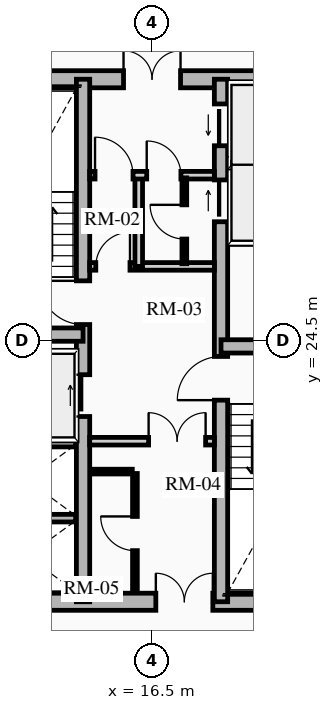
"""IFC4 building model, lengths in metres.
Left out: names, types, materials, properties, quantities, classifications, styles, units other than length and angle.
Written with IfcOpenShell. Run it as: python <this file> out.ifc"""

import sys

from ifc_helpers import new_model, si_unit, direction, frame, frame_2d, origin, place, context, subcontext, project, spatial, rectangle, extrude, source, transform, mapped, element, fill, save


model = new_model("IFC4")
c1 = context("Model", 3, precision=1e-05, world=origin(), true_north=direction((0.0, 1.0)))
c2 = subcontext(c1, "Body", "Model", "MODEL_VIEW")
j1 = project(units=[si_unit("LENGTHUNIT", "METRE"), si_unit("PLANEANGLEUNIT", "RADIAN")], contexts=[c1])
p1 = place(None, origin())
s1 = spatial("IfcSite", under=j1, at=p1, CompositionType="ELEMENT")
p2 = place(p1, origin())
s2 = spatial("IfcBuilding", under=s1, at=p2, CompositionType="ELEMENT")
p3 = place(p2, frame((0.0, 0.0, 105.07)))
s3 = spatial("IfcBuildingStorey", under=s2, at=p3, CompositionType="ELEMENT", Elevation=105.07)
p4 = place(p3, frame((11.15, 17.625, 0.0), z_axis=(0.0, 0.0, 1.0), x_axis=(1.0, 0.0, 0.0)))
e1 = element("IfcWall", 1, at=p4, inside=s3, PredefinedType="SHEAR", context=c2, shape_type="SweptSolid", body=[
    extrude(rectangle(XDim=10.7, YDim=0.45, at=frame_2d((5.35, 0.0))), origin(), (0.0, 0.0, 1.0), 2.91),
])
m1 = source(origin(), c2, "Body", "SweptSolid", [
    extrude(rectangle(XDim=1.5, YDim=2.02, at=frame_2d((0.75, 1.01))), frame((0.0, 0.235, 0.0), z_axis=(0.0, -1.0, 0.0), x_axis=(1.0, 0.0, 0.0)), (0.0, 0.0, 1.0), 0.47),
])
p5 = place(p4, frame((5.45, 0.0, 0.0)))
e2 = element("IfcOpeningElement", 2, at=p5, cuts=e1, PredefinedType="OPENING", context=c2, shape_type="MappedRepresentation", body=[
    mapped(m1, transform((0.0, 0.0, 0.0), x_axis=(1.0, 0.0, 0.0), y_axis=(0.0, 1.0, 0.0), z_axis=(0.0, 0.0, 1.0), scale=1.0)),
])
p6 = place(p3, frame((11.15, 31.375, 0.0), z_axis=(0.0, 0.0, 1.0), x_axis=(1.0, 0.0, 0.0)))
e3 = element("IfcWall", 3, at=p6, inside=s3, PredefinedType="SHEAR", context=c2, shape_type="SweptSolid", body=[
    extrude(rectangle(XDim=10.7, YDim=0.45, at=frame_2d((5.35, 0.0))), origin(), (0.0, 0.0, 1.0), 2.91),
])
p7 = place(p6, frame((4.6, 0.0, 0.0)))
e4 = element("IfcOpeningElement", 4, at=p7, cuts=e3, PredefinedType="OPENING", context=c2, shape_type="MappedRepresentation", body=[
    mapped(m1, transform((0.0, 0.0, 0.0), x_axis=(1.0, 0.0, 0.0), y_axis=(0.0, 1.0, 0.0), z_axis=(0.0, 0.0, 1.0), scale=1.0)),
])
p8 = place(p3, frame((14.685, 17.625, 0.0), z_axis=(0.0, 0.0, 1.0), x_axis=(0.0, 1.0, 0.0)))
e5 = element("IfcWall", 5, at=p8, inside=s3, PredefinedType="SHEAR", context=c2, shape_type="SweptSolid", body=[
    extrude(rectangle(XDim=13.75, YDim=0.35, at=frame_2d((6.875, 0.0))), origin(), (0.0, 0.0, 1.0), 2.91),
])
m2 = source(origin(), c2, "Body", "SweptSolid", [
    extrude(rectangle(XDim=1.1, YDim=2.015, at=frame_2d((0.55, 1.007))), frame((0.0, 0.185, 0.0), z_axis=(0.0, -1.0, 0.0), x_axis=(1.0, 0.0, 0.0)), (0.0, 0.0, 1.0), 0.37),
])
p9 = place(p8, frame((4.875, 0.0, 0.0)))
e6 = element("IfcOpeningElement", 6, at=p9, cuts=e5, PredefinedType="OPENING", context=c2, shape_type="MappedRepresentation", body=[
    mapped(m2, transform((0.0, 0.0, 0.0), x_axis=(1.0, 0.0, 0.0), y_axis=(0.0, 1.0, 0.0), z_axis=(0.0, 0.0, 1.0), scale=1.0)),
])
m3 = source(origin(), c2, "Body", "SweptSolid", [
    extrude(rectangle(XDim=1.15, YDim=2.02, at=frame_2d((0.575, 1.01))), frame((0.0, 0.185, 0.0), z_axis=(0.0, -1.0, 0.0), x_axis=(1.0, 0.0, 0.0)), (0.0, 0.0, 1.0), 0.37),
])
p10 = place(p8, frame((7.295, 0.0, 0.0)))
e7 = element("IfcOpeningElement", 7, at=p10, cuts=e5, PredefinedType="OPENING", context=c2, shape_type="MappedRepresentation", body=[
    mapped(m3, transform((0.0, 0.0, 0.0), x_axis=(1.0, 0.0, 0.0), y_axis=(0.0, 1.0, 0.0), z_axis=(0.0, 0.0, 1.0), scale=1.0)),
])
p11 = place(p3, frame((18.315, 17.625, 0.0), z_axis=(0.0, 0.0, 1.0), x_axis=(0.0, 1.0, 0.0)))
e8 = element("IfcWall", 8, at=p11, inside=s3, PredefinedType="SHEAR", context=c2, shape_type="SweptSolid", body=[
    extrude(rectangle(XDim=13.75, YDim=0.35, at=frame_2d((6.875, 0.0))), origin(), (0.0, 0.0, 1.0), 2.91),
])
p12 = place(p11, frame((10.0, 0.0, 0.0)))
e9 = element("IfcOpeningElement", 9, at=p12, cuts=e8, PredefinedType="OPENING", context=c2, shape_type="MappedRepresentation", body=[
    mapped(m2, transform((0.0, 0.0, 0.0), x_axis=(1.0, 0.0, 0.0), y_axis=(0.0, 1.0, 0.0), z_axis=(0.0, 0.0, 1.0), scale=1.0)),
])
p13 = place(p11, frame((12.0, 0.0, 0.0)))
e10 = element("IfcOpeningElement", 10, at=p13, cuts=e8, PredefinedType="OPENING", context=c2, shape_type="MappedRepresentation", body=[
    mapped(m2, transform((0.0, 0.0, 0.0), x_axis=(1.0, 0.0, 0.0), y_axis=(0.0, 1.0, 0.0), z_axis=(0.0, 0.0, 1.0), scale=1.0)),
])
p14 = place(p11, frame((5.305, 0.0, 0.0)))
e11 = element("IfcOpeningElement", 11, at=p14, cuts=e8, PredefinedType="OPENING", context=c2, shape_type="MappedRepresentation", body=[
    mapped(m3, transform((0.0, 0.0, 0.0), x_axis=(1.0, 0.0, 0.0), y_axis=(0.0, 1.0, 0.0), z_axis=(0.0, 0.0, 1.0), scale=1.0)),
])
for number, where, z_axis, x_axis in (
    (12, (11.4, 24.655, 0.0), (0.0, 0.0, 1.0), (1.0, 0.0, 0.0)),
    (13, (18.315, 24.345, 0.0), (0.0, 0.0, 1.0), (1.0, 0.0, 0.0)),
):
    element("IfcWall", number, at=place(p3, frame(where, z_axis=z_axis, x_axis=x_axis)), inside=s3, PredefinedType="SHEAR", context=c2, shape_type="SweptSolid", body=[
        extrude(rectangle(XDim=3.285, YDim=0.35, at=frame_2d((1.643, 0.0))), origin(), (0.0, 0.0, 1.0), 2.91),
    ])
for number, where, z_axis, x_axis in (
    (14, (11.52, 21.8, 0.0), (0.0, 0.0, 1.0), (1.0, 0.0, 0.0)),
    (15, (11.52, 19.825, 0.0), (0.0, 0.0, 1.0), (1.0, 0.0, 0.0)),
    (16, (18.51, 27.13, 0.0), (0.0, 0.0, 1.0), (1.0, 0.0, 0.0)),
    (17, (18.51, 29.175, 0.0), (0.0, 0.0, 1.0), (1.0, 0.0, 0.0)),
):
    element("IfcWall", number, at=place(p3, frame(where, z_axis=z_axis, x_axis=x_axis)), inside=s3, PredefinedType="SHEAR", context=c2, shape_type="SweptSolid", body=[
        extrude(rectangle(XDim=2.97, YDim=0.2, at=frame_2d((1.485, 0.0))), origin(), (0.0, 0.0, 1.0), 2.91),
    ])
p15 = place(p3, frame((14.86, 21.85, 0.0), z_axis=(0.0, 0.0, 1.0), x_axis=(1.0, 0.0, 0.0)))
e18 = element("IfcWall", 18, at=p15, inside=s3, PredefinedType="PARTITIONING", context=c2, shape_type="SweptSolid", body=[
    extrude(rectangle(XDim=3.28, YDim=0.2, at=frame_2d((1.64, 0.0))), origin(), (0.0, 0.0, 1.0), 2.655),
])
m4 = source(origin(), c2, "Body", "SweptSolid", [
    extrude(rectangle(XDim=1.5, YDim=2.02, at=frame_2d((0.75, 1.01))), frame((0.0, 0.11, 0.0), z_axis=(0.0, -1.0, 0.0), x_axis=(1.0, 0.0, 0.0)), (0.0, 0.0, 1.0), 0.22),
])
p16 = place(p15, frame((1.55, 0.0, 0.0)))
e19 = element("IfcOpeningElement", 19, at=p16, cuts=e18, PredefinedType="OPENING", context=c2, shape_type="MappedRepresentation", body=[
    mapped(m4, transform((0.0, 0.0, 0.0), x_axis=(1.0, 0.0, 0.0), y_axis=(0.0, 1.0, 0.0), z_axis=(0.0, 0.0, 1.0), scale=1.0)),
])
p17 = place(p3, frame((14.86, 26.45, 0.0), z_axis=(0.0, 0.0, 1.0), x_axis=(1.0, 0.0, 0.0)))
e20 = element("IfcWall", 20, at=p17, inside=s3, PredefinedType="PARTITIONING", context=c2, shape_type="SweptSolid", body=[
    extrude(rectangle(XDim=3.28, YDim=0.2, at=frame_2d((1.64, 0.0))), origin(), (0.0, 0.0, 1.0), 2.655),
])
m5 = source(origin(), c2, "Body", "SweptSolid", [
    extrude(rectangle(XDim=0.9, YDim=2.005, at=frame_2d((0.45, 1.002))), frame((0.0, 0.11, 0.0), z_axis=(0.0, -1.0, 0.0), x_axis=(1.0, 0.0, 0.0)), (0.0, 0.0, 1.0), 0.22),
])
p18 = place(p17, frame((0.16, 0.0, 0.0)))
e21 = element("IfcOpeningElement", 21, at=p18, cuts=e20, PredefinedType="OPENING", context=c2, shape_type="MappedRepresentation", body=[
    mapped(m5, transform((0.0, 0.0, 0.0), x_axis=(1.0, 0.0, 0.0), y_axis=(0.0, 1.0, 0.0), z_axis=(0.0, 0.0, 1.0), scale=1.0)),
])
p19 = place(p3, frame((16.15, 26.45, 0.0), z_axis=(0.0, 0.0, 1.0), x_axis=(0.0, 1.0, 0.0)))
e22 = element("IfcWall", 22, at=p19, inside=s3, PredefinedType="PARTITIONING", context=c2, shape_type="SweptSolid", body=[
    extrude(rectangle(XDim=2.4, YDim=0.2, at=frame_2d((1.2, 0.0))), origin(), (0.0, 0.0, 1.0), 2.655),
])
p20 = place(p3, frame((14.86, 28.85, 0.0), z_axis=(0.0, 0.0, 1.0), x_axis=(1.0, 0.0, 0.0)))
e23 = element("IfcWall", 23, at=p20, inside=s3, PredefinedType="PARTITIONING", context=c2, shape_type="SweptSolid", body=[
    extrude(rectangle(XDim=3.28, YDim=0.2, at=frame_2d((1.64, 0.0))), origin(), (0.0, 0.0, 1.0), 2.655),
])
m6 = source(origin(), c2, "Body", "SweptSolid", [
    extrude(rectangle(XDim=1.0, YDim=2.015, at=frame_2d((0.5, 1.007))), frame((0.0, 0.11, 0.0), z_axis=(0.0, -1.0, 0.0), x_axis=(1.0, 0.0, 0.0)), (0.0, 0.0, 1.0), 0.22),
])
p21 = place(p20, frame((0.14, 0.0, 0.0)))
e24 = element("IfcOpeningElement", 24, at=p21, cuts=e23, PredefinedType="OPENING", context=c2, shape_type="MappedRepresentation", body=[
    mapped(m6, transform((0.0, 0.0, 0.0), x_axis=(1.0, 0.0, 0.0), y_axis=(0.0, 1.0, 0.0), z_axis=(0.0, 0.0, 1.0), scale=1.0)),
])
p22 = place(p20, frame((1.5, 0.0, 0.0)))
e25 = element("IfcOpeningElement", 25, at=p22, cuts=e23, PredefinedType="OPENING", context=c2, shape_type="MappedRepresentation", body=[
    mapped(m5, transform((0.0, 0.0, 0.0), x_axis=(1.0, 0.0, 0.0), y_axis=(0.0, 1.0, 0.0), z_axis=(0.0, 0.0, 1.0), scale=1.0)),
])
p23 = place(p3, frame((16.05, 17.92, 0.0), z_axis=(0.0, 0.0, 1.0), x_axis=(0.0, 1.0, 0.0)))
e26 = element("IfcWall", 26, at=p23, inside=s3, PredefinedType="PARTITIONING", context=c2, shape_type="SweptSolid", body=[
    extrude(rectangle(XDim=3.08, YDim=0.125, at=frame_2d((1.54, 0.0))), origin(), (0.0, 0.0, 1.0), 2.655),
])
m7 = source(origin(), c2, "Body", "SweptSolid", [
    extrude(rectangle(XDim=0.9, YDim=2.005, at=frame_2d((0.45, 1.002))), frame((0.0, 0.073, 0.0), z_axis=(0.0, -1.0, 0.0), x_axis=(1.0, 0.0, 0.0)), (0.0, 0.0, 1.0), 0.145),
])
p24 = place(p23, frame((1.05, 0.0, 0.0)))
e27 = element("IfcOpeningElement", 27, at=p24, cuts=e26, PredefinedType="OPENING", context=c2, shape_type="MappedRepresentation", body=[
    mapped(m7, transform((0.0, 0.0, 0.0), x_axis=(1.0, 0.0, 0.0), y_axis=(0.0, 1.0, 0.0), z_axis=(0.0, 0.0, 1.0), scale=1.0)),
])
p25 = place(p3, frame((14.88, 21.05, 0.0), z_axis=(0.0, 0.0, 1.0), x_axis=(1.0, 0.0, 0.0)))
e28 = element("IfcWall", 28, at=p25, inside=s3, PredefinedType="PARTITIONING", context=c2, shape_type="SweptSolid", body=[
    extrude(rectangle(XDim=1.1, YDim=0.125, at=frame_2d((0.55, 0.0))), origin(), (0.0, 0.0, 1.0), 2.655),
])
p26 = place(p3, frame((17.35, 26.52, 0.0), z_axis=(0.0, 0.0, 1.0), x_axis=(0.0, 1.0, 0.0)))
e29 = element("IfcWall", 29, at=p26, inside=s3, PredefinedType="PARTITIONING", context=c2, shape_type="SweptSolid", body=[
    extrude(rectangle(XDim=2.26, YDim=0.125, at=frame_2d((1.13, 0.0))), origin(), (0.0, 0.0, 1.0), 2.655),
])
p27 = place(p26, frame((0.65, 0.0, 0.0)))
e30 = element("IfcOpeningElement", 30, at=p27, cuts=e29, PredefinedType="OPENING", context=c2, shape_type="MappedRepresentation", body=[
    mapped(m7, transform((0.0, 0.0, 0.0), x_axis=(1.0, 0.0, 0.0), y_axis=(0.0, 1.0, 0.0), z_axis=(0.0, 0.0, 1.0), scale=1.0)),
])
m8 = source(origin(), c2, "Body", "SweptSolid", [
    extrude(rectangle(XDim=1.1, YDim=2.015, at=frame_2d((0.55, 1.007))), frame((0.0, 0.025, 0.0), z_axis=(0.0, -1.0, 0.0), x_axis=(1.0, 0.0, 0.0)), (0.0, 0.0, 1.0), 0.05),
])
p28 = place(p9, origin())
e31 = element("IfcDoor", 31, at=p28, inside=s3, OperationType="SLIDING_TO_RIGHT", PredefinedType="DOOR", context=c2, shape_type="MappedRepresentation", body=[
    mapped(m8, transform((0.0, 0.0, 0.0), x_axis=(1.0, 0.0, 0.0), y_axis=(0.0, 1.0, 0.0), z_axis=(0.0, 0.0, 1.0), scale=1.0)),
])
fill(e6, e31)
p29 = place(p12, origin())
e32 = element("IfcDoor", 32, at=p29, inside=s3, OperationType="SLIDING_TO_RIGHT", PredefinedType="DOOR", context=c2, shape_type="MappedRepresentation", body=[
    mapped(m8, transform((0.0, 0.0, 0.0), x_axis=(1.0, 0.0, 0.0), y_axis=(0.0, 1.0, 0.0), z_axis=(0.0, 0.0, 1.0), scale=1.0)),
])
fill(e9, e32)
p30 = place(p13, origin())
e33 = element("IfcDoor", 33, at=p30, inside=s3, OperationType="SLIDING_TO_LEFT", PredefinedType="DOOR", context=c2, shape_type="MappedRepresentation", body=[
    mapped(m8, transform((0.0, 0.0, 0.0), x_axis=(1.0, 0.0, 0.0), y_axis=(0.0, 1.0, 0.0), z_axis=(0.0, 0.0, 1.0), scale=1.0)),
])
fill(e10, e33)
m9 = source(origin(), c2, "Body", "SweptSolid", [
    extrude(rectangle(XDim=1.15, YDim=2.02, at=frame_2d((0.575, 1.01))), frame((0.0, 0.025, 0.0), z_axis=(0.0, -1.0, 0.0), x_axis=(1.0, 0.0, 0.0)), (0.0, 0.0, 1.0), 0.05),
])
p31 = place(p10, origin())
e34 = element("IfcDoor", 34, at=p31, inside=s3, OperationType="SINGLE_SWING_RIGHT", PredefinedType="DOOR", context=c2, shape_type="MappedRepresentation", body=[
    mapped(m9, transform((0.0, 0.0, 0.0), x_axis=(1.0, 0.0, 0.0), y_axis=(0.0, 1.0, 0.0), z_axis=(0.0, 0.0, 1.0), scale=1.0)),
])
fill(e7, e34)
p32 = place(p14, origin())
e35 = element("IfcDoor", 35, at=p32, inside=s3, OperationType="SINGLE_SWING_LEFT", PredefinedType="DOOR", context=c2, shape_type="MappedRepresentation", body=[
    mapped(m9, transform((0.0, 0.0, 0.0), x_axis=(1.0, 0.0, 0.0), y_axis=(0.0, 1.0, 0.0), z_axis=(0.0, 0.0, 1.0), scale=1.0)),
])
fill(e11, e35)
m10 = source(origin(), c2, "Body", "SweptSolid", [
    extrude(rectangle(XDim=1.5, YDim=2.02, at=frame_2d((0.75, 1.01))), frame((0.0, 0.025, 0.0), z_axis=(0.0, -1.0, 0.0), x_axis=(1.0, 0.0, 0.0)), (0.0, 0.0, 1.0), 0.05),
])
p33 = place(p7, origin())
e36 = element("IfcDoor", 36, at=p33, inside=s3, OperationType="DOUBLE_DOOR_SINGLE_SWING", PredefinedType="DOOR", context=c2, shape_type="MappedRepresentation", body=[
    mapped(m10, transform((0.0, 0.0, 0.0), x_axis=(1.0, 0.0, 0.0), y_axis=(0.0, 1.0, 0.0), z_axis=(0.0, 0.0, 1.0), scale=1.0)),
])
fill(e4, e36)
p34 = place(p5, origin())
e37 = element("IfcDoor", 37, at=p34, inside=s3, OperationType="DOUBLE_DOOR_SINGLE_SWING", PredefinedType="DOOR", context=c2, shape_type="MappedRepresentation", body=[
    mapped(m10, transform((0.0, 0.0, 0.0), x_axis=(1.0, 0.0, 0.0), y_axis=(0.0, 1.0, 0.0), z_axis=(0.0, 0.0, 1.0), scale=1.0)),
])
fill(e2, e37)
p35 = place(p16, origin())
e38 = element("IfcDoor", 38, at=p35, inside=s3, OperationType="DOUBLE_DOOR_SINGLE_SWING", PredefinedType="DOOR", context=c2, shape_type="MappedRepresentation", body=[
    mapped(m10, transform((0.0, 0.0, 0.0), x_axis=(1.0, 0.0, 0.0), y_axis=(0.0, 1.0, 0.0), z_axis=(0.0, 0.0, 1.0), scale=1.0)),
])
fill(e19, e38)
m11 = source(origin(), c2, "Body", "SweptSolid", [
    extrude(rectangle(XDim=0.9, YDim=2.005, at=frame_2d((0.45, 1.002))), frame((0.0, 0.025, 0.0), z_axis=(0.0, -1.0, 0.0), x_axis=(1.0, 0.0, 0.0)), (0.0, 0.0, 1.0), 0.05),
])
p36 = place(p18, origin())
e39 = element("IfcDoor", 39, at=p36, inside=s3, OperationType="SINGLE_SWING_RIGHT", PredefinedType="DOOR", context=c2, shape_type="MappedRepresentation", body=[
    mapped(m11, transform((0.0, 0.0, 0.0), x_axis=(1.0, 0.0, 0.0), y_axis=(0.0, 1.0, 0.0), z_axis=(0.0, 0.0, 1.0), scale=1.0)),
])
fill(e21, e39)
m12 = source(origin(), c2, "Body", "SweptSolid", [
    extrude(rectangle(XDim=1.0, YDim=2.015, at=frame_2d((0.5, 1.007))), frame((0.0, 0.025, 0.0), z_axis=(0.0, -1.0, 0.0), x_axis=(1.0, 0.0, 0.0)), (0.0, 0.0, 1.0), 0.05),
])
p37 = place(p21, origin())
e40 = element("IfcDoor", 40, at=p37, inside=s3, OperationType="SINGLE_SWING_LEFT", PredefinedType="DOOR", context=c2, shape_type="MappedRepresentation", body=[
    mapped(m12, transform((0.0, 0.0, 0.0), x_axis=(1.0, 0.0, 0.0), y_axis=(0.0, 1.0, 0.0), z_axis=(0.0, 0.0, 1.0), scale=1.0)),
])
fill(e24, e40)
p38 = place(p24, origin())
e41 = element("IfcDoor", 41, at=p38, inside=s3, OperationType="SINGLE_SWING_RIGHT", PredefinedType="DOOR", context=c2, shape_type="MappedRepresentation", body=[
    mapped(m11, transform((0.0, 0.0, 0.0), x_axis=(1.0, 0.0, 0.0), y_axis=(0.0, 1.0, 0.0), z_axis=(0.0, 0.0, 1.0), scale=1.0)),
])
fill(e27, e41)
p39 = place(p22, origin())
e42 = element("IfcDoor", 42, at=p39, inside=s3, OperationType="SINGLE_SWING_LEFT", PredefinedType="DOOR", context=c2, shape_type="MappedRepresentation", body=[
    mapped(m11, transform((0.0, 0.0, 0.0), x_axis=(1.0, 0.0, 0.0), y_axis=(0.0, 1.0, 0.0), z_axis=(0.0, 0.0, 1.0), scale=1.0)),
])
fill(e25, e42)
p40 = place(p27, origin())
e43 = element("IfcDoor", 43, at=p40, inside=s3, OperationType="SINGLE_SWING_RIGHT", PredefinedType="DOOR", context=c2, shape_type="MappedRepresentation", body=[
    mapped(m11, transform((0.0, 0.0, 0.0), x_axis=(1.0, 0.0, 0.0), y_axis=(0.0, 1.0, 0.0), z_axis=(0.0, 0.0, 1.0), scale=1.0)),
])
fill(e30, e43)
save(model, sys.argv[1])
